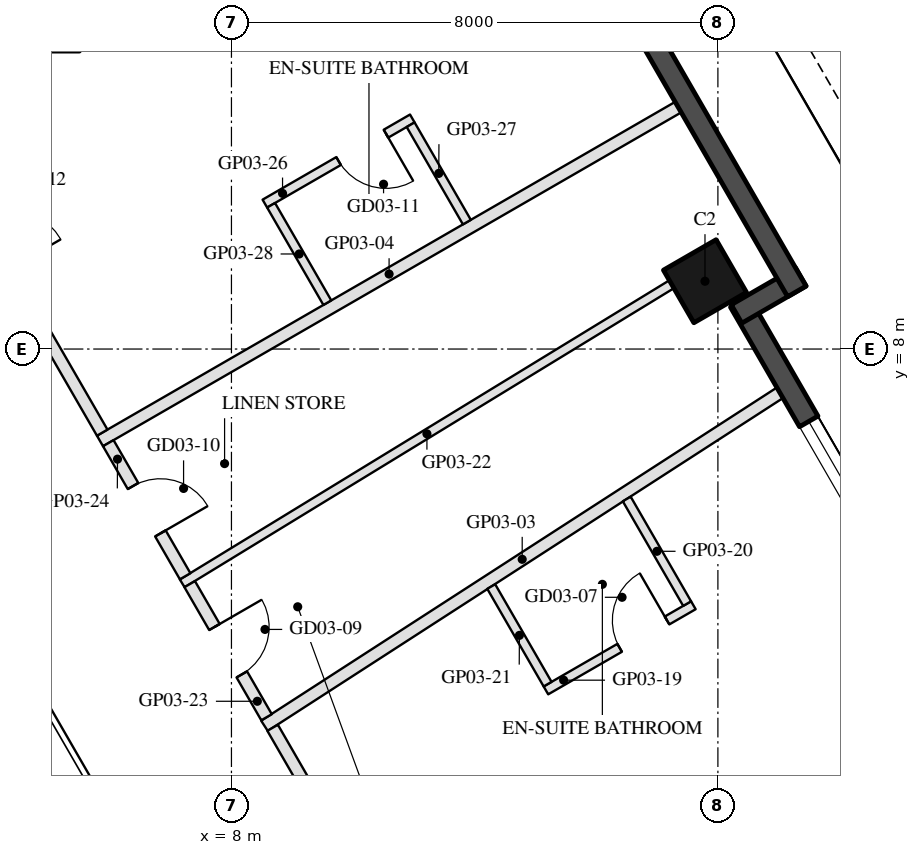
"""IFC4 building model, lengths in metres.
Left out: names, types, materials, properties, quantities, classifications, styles, units other than length and angle.
Written with IfcOpenShell. Run it as: python <this file> out.ifc"""

import sys

from ifc_helpers import new_model, si_unit, direction, frame, frame_2d, origin, origin_2d, place, context, subcontext, project, spatial, rectangle, hollow_rectangle, extrude, element, fill, save


model = new_model("IFC4")
c1 = context("Model", 3, precision=1e-05, world=origin(), true_north=direction((0.0, 1.0)))
c2 = subcontext(c1, "Body", "Model", "MODEL_VIEW")
j1 = project(units=[si_unit("LENGTHUNIT", "METRE"), si_unit("PLANEANGLEUNIT", "RADIAN")], contexts=[c1])
p1 = place(None, origin())
s1 = spatial("IfcSite", under=j1, at=p1, CompositionType="ELEMENT")
p2 = place(p1, origin())
s2 = spatial("IfcBuilding", under=s1, at=p2, CompositionType="ELEMENT")
p3 = place(p2, frame((0.0, 0.0, 68.7)))
s3 = spatial("IfcBuildingStorey", under=s2, at=p3, CompositionType="ELEMENT", Elevation=68.7)
p4 = place(p3, frame((15.788, 9.115, 0.0), z_axis=(0.0, 0.0, 1.0), x_axis=(-0.5, 0.866025403784, 0.0)))
e1 = element("IfcColumn", 1, at=p4, inside=s3, PredefinedType="COLUMN", context=c2, shape_type="SweptSolid", body=[
    extrude(hollow_rectangle(XDim=1.0, YDim=1.0, WallThickness=0.045, at=origin_2d()), origin(), (0.0, 0.0, 1.0), 3.7),
])
p5 = place(p3, frame((19.729, 2.938, 0.0), z_axis=(0.0, 0.0, 1.0), x_axis=(-0.499976430342, 0.866039011305, 0.0)))
e2 = element("IfcWall", 2, at=p5, inside=s3, PredefinedType="SOLIDWALL", context=c2, shape_type="SweptSolid", body=[
    extrude(rectangle(XDim=6.74, YDim=0.35, at=frame_2d((3.37, 0.0))), origin(), (0.0, 0.0, 1.0), 3.55),
])
p6 = place(p5, frame((0.77, 0.0, 0.3)))
e3 = element("IfcOpeningElement", 3, at=p6, cuts=e2, PredefinedType="OPENING", context=c2, shape_type="SweptSolid", body=[
    extrude(rectangle(XDim=1.7, YDim=2.65, at=frame_2d((0.85, 1.325))), frame((0.0, 0.185, 0.0), z_axis=(0.0, -1.0, 0.0), x_axis=(1.0, 0.0, 0.0)), (0.0, 0.0, 1.0), 0.37),
])
p7 = place(p5, frame((2.77, 0.0, 0.3)))
e4 = element("IfcOpeningElement", 4, at=p7, cuts=e2, PredefinedType="OPENING", context=c2, shape_type="SweptSolid", body=[
    extrude(rectangle(XDim=1.7, YDim=2.65, at=frame_2d((0.85, 1.325))), frame((0.0, 0.185, 0.0), z_axis=(0.0, -1.0, 0.0), x_axis=(1.0, 0.0, 0.0)), (0.0, 0.0, 1.0), 0.37),
])
p8 = place(p3, frame((16.306, 8.577, 0.0), z_axis=(0.0, 0.0, 1.0), x_axis=(0.866092288191, 0.499884134912, 0.0)))
e5 = element("IfcWall", 5, at=p8, inside=s3, PredefinedType="SOLIDWALL", context=c2, shape_type="SweptSolid", body=[
    extrude(rectangle(XDim=1.22, YDim=0.35, at=frame_2d((0.61, 0.0))), origin(), (0.0, 0.0, 1.0), 3.55),
])
p9 = place(p3, frame((17.299, 8.948, 0.0), z_axis=(0.0, 0.0, 1.0), x_axis=(-0.500010041276, 0.866019606374, 0.0)))
e6 = element("IfcWall", 6, at=p9, inside=s3, PredefinedType="SOLIDWALL", context=c2, shape_type="SweptSolid", body=[
    extrude(rectangle(XDim=9.7, YDim=0.35, at=frame_2d((4.85, 0.0))), origin(), (0.0, 0.0, 1.0), 3.55),
])
p10 = place(p9, frame((4.949, 0.0, 0.3)))
e7 = element("IfcOpeningElement", 7, at=p10, cuts=e6, PredefinedType="OPENING", context=c2, shape_type="SweptSolid", body=[
    extrude(rectangle(XDim=3.0, YDim=2.65, at=frame_2d((1.5, 1.325))), frame((0.0, 0.185, 0.0), z_axis=(0.0, -1.0, 0.0), x_axis=(1.0, 0.0, 0.0)), (0.0, 0.0, 1.0), 0.37),
])
p11 = place(p3, frame((17.02, 7.28, 0.0), z_axis=(0.0, 0.0, 1.0), x_axis=(-0.839924980805, -0.542702521294, 0.0)))
e8 = element("IfcWall", 8, at=p11, inside=s3, PredefinedType="PARTITIONING", context=c2, shape_type="SweptSolid", body=[
    extrude(rectangle(XDim=10.093, YDim=0.2, at=frame_2d((5.046, 0.0))), origin(), (0.0, 0.0, 1.0), 2.96),
])
p12 = place(p3, frame((15.347, 11.978, 0.0), z_axis=(0.0, 0.0, 1.0), x_axis=(-0.866027479907, -0.499996404033, 0.0)))
e9 = element("IfcWall", 9, at=p12, inside=s3, PredefinedType="PARTITIONING", context=c2, shape_type="SweptSolid", body=[
    extrude(rectangle(XDim=10.98, YDim=0.2, at=frame_2d((5.49, 0.0))), origin(), (0.0, 0.0, 1.0), 2.96),
])
p13 = place(p3, frame((8.677, 1.771, 0.0), z_axis=(0.0, 0.0, 1.0), x_axis=(0.50000293509, -0.866023709203, 0.0)))
e10 = element("IfcWall", 10, at=p13, inside=s3, PredefinedType="PARTITIONING", context=c2, shape_type="SweptSolid", body=[
    extrude(rectangle(XDim=7.183, YDim=0.2, at=frame_2d((3.592, 0.0))), origin(), (0.0, 0.0, 1.0), 2.95),
])
p14 = place(p13, frame((3.092, 0.0, 0.0)))
e11 = element("IfcOpeningElement", 11, at=p14, cuts=e10, PredefinedType="OPENING", context=c2, shape_type="SweptSolid", body=[
    extrude(rectangle(XDim=1.0, YDim=2.1, at=frame_2d((0.5, 1.05))), frame((0.0, 0.11, 0.0), z_axis=(0.0, -1.0, 0.0), x_axis=(1.0, 0.0, 0.0)), (0.0, 0.0, 1.0), 0.22),
])
p15 = place(p3, frame((13.172, 2.386, 0.0), z_axis=(0.0, 0.0, 1.0), x_axis=(0.865996816683, 0.500049511043, 0.0)))
e12 = element("IfcWall", 12, at=p15, inside=s3, PredefinedType="PARTITIONING", context=c2, shape_type="SweptSolid", body=[
    extrude(rectangle(XDim=2.8, YDim=0.15, at=frame_2d((1.4, 0.0))), origin(), (0.0, 0.0, 1.0), 3.55),
])
p16 = place(p15, frame((1.4, 0.0, 0.0)))
e13 = element("IfcOpeningElement", 13, at=p16, cuts=e12, PredefinedType="OPENING", context=c2, shape_type="SweptSolid", body=[
    extrude(rectangle(XDim=0.9, YDim=2.1, at=frame_2d((0.45, 1.05))), frame((0.0, 0.085, 0.0), z_axis=(0.0, -1.0, 0.0), x_axis=(1.0, 0.0, 0.0)), (0.0, 0.0, 1.0), 0.17),
])
p17 = place(p3, frame((15.494, 3.813, 0.0), z_axis=(0.0, 0.0, 1.0), x_axis=(-0.499945861543, 0.866056658381, 0.0)))
e14 = element("IfcWall", 14, at=p17, inside=s3, PredefinedType="PARTITIONING", context=c2, shape_type="SweptSolid", body=[
    extrude(rectangle(XDim=1.987, YDim=0.15, at=frame_2d((0.993, 0.0))), origin(), (0.0, 0.0, 1.0), 2.95),
])
p18 = place(p3, frame((13.199, 2.488, 0.0), z_axis=(0.0, 0.0, 1.0), x_axis=(-0.499992292652, 0.866029853578, 0.0)))
e15 = element("IfcWall", 15, at=p18, inside=s3, PredefinedType="PARTITIONING", context=c2, shape_type="SweptSolid", body=[
    extrude(rectangle(XDim=1.854, YDim=0.15, at=frame_2d((0.927, 0.0))), origin(), (0.0, 0.0, 1.0), 2.95),
])
p19 = place(p3, frame((15.239, 9.065, 0.0), z_axis=(0.0, 0.0, 1.0), x_axis=(-0.853241525467, -0.521515962573, 0.0)))
e16 = element("IfcWall", 16, at=p19, inside=s3, PredefinedType="PARTITIONING", context=c2, shape_type="SweptSolid", body=[
    extrude(rectangle(XDim=9.433, YDim=0.15, at=frame_2d((4.716, 0.0))), origin(), (0.0, 0.0, 1.0), 2.95),
])
p20 = place(p3, frame((7.313, 4.133, 0.0), z_axis=(0.0, 0.0, 1.0), x_axis=(0.500003972934, -0.866023109998, 0.0)))
e17 = element("IfcWall", 17, at=p20, inside=s3, PredefinedType="PARTITIONING", context=c2, shape_type="SweptSolid", body=[
    extrude(rectangle(XDim=2.527, YDim=0.2, at=frame_2d((1.264, 0.0))), origin(), (0.0, 0.0, 1.0), 2.95),
])
p21 = place(p20, frame((0.814, 0.0, 0.0)))
e18 = element("IfcOpeningElement", 18, at=p21, cuts=e17, PredefinedType="OPENING", context=c2, shape_type="SweptSolid", body=[
    extrude(rectangle(XDim=0.9, YDim=2.1, at=frame_2d((0.45, 1.05))), frame((0.0, 0.11, 0.0), z_axis=(0.0, -1.0, 0.0), x_axis=(1.0, 0.0, 0.0)), (0.0, 0.0, 1.0), 0.22),
])
p22 = place(p3, frame((5.975, 6.452, 0.0), z_axis=(0.0, 0.0, 1.0), x_axis=(0.499962146402, -0.866047257466, 0.0)))
e19 = element("IfcWall", 19, at=p22, inside=s3, PredefinedType="PARTITIONING", context=c2, shape_type="SweptSolid", body=[
    extrude(rectangle(XDim=2.528, YDim=0.2, at=frame_2d((1.264, 0.0))), origin(), (0.0, 0.0, 1.0), 2.95),
])
p23 = place(p22, frame((0.814, 0.0, 0.0)))
e20 = element("IfcOpeningElement", 20, at=p23, cuts=e19, PredefinedType="OPENING", context=c2, shape_type="SweptSolid", body=[
    extrude(rectangle(XDim=0.9, YDim=2.1, at=frame_2d((0.45, 1.05))), frame((0.0, 0.11, 0.0), z_axis=(0.0, -1.0, 0.0), x_axis=(1.0, 0.0, 0.0)), (0.0, 0.0, 1.0), 0.22),
])
p24 = place(p3, frame((2.281, 12.85, 0.0), z_axis=(0.0, 0.0, 1.0), x_axis=(0.499992939664, -0.866029480033, 0.0)))
e21 = element("IfcWall", 21, at=p24, inside=s3, PredefinedType="PARTITIONING", context=c2, shape_type="SweptSolid", body=[
    extrude(rectangle(XDim=7.188, YDim=0.2, at=frame_2d((3.594, 0.0))), origin(), (0.0, 0.0, 1.0), 2.95),
])
p25 = place(p24, frame((3.094, 0.0, 0.0)))
e22 = element("IfcOpeningElement", 22, at=p25, cuts=e21, PredefinedType="OPENING", context=c2, shape_type="SweptSolid", body=[
    extrude(rectangle(XDim=1.0, YDim=2.1, at=frame_2d((0.5, 1.05))), frame((0.0, 0.11, 0.0), z_axis=(0.0, -1.0, 0.0), x_axis=(1.0, 0.0, 0.0)), (0.0, 0.0, 1.0), 0.22),
])
p26 = place(p3, frame((10.974, 11.792, 0.0), z_axis=(0.0, 0.0, 1.0), x_axis=(-0.866056369097, -0.49994636267, 0.0)))
e23 = element("IfcWall", 23, at=p26, inside=s3, PredefinedType="PARTITIONING", context=c2, shape_type="SweptSolid", body=[
    extrude(rectangle(XDim=2.8, YDim=0.15, at=frame_2d((1.4, 0.0))), origin(), (0.0, 0.0, 1.0), 3.55),
])
p27 = place(p26, frame((0.5, 0.0, 0.0)))
e24 = element("IfcOpeningElement", 24, at=p27, cuts=e23, PredefinedType="OPENING", context=c2, shape_type="SweptSolid", body=[
    extrude(rectangle(XDim=0.9, YDim=2.1, at=frame_2d((0.45, 1.05))), frame((0.0, 0.085, 0.0), z_axis=(0.0, -1.0, 0.0), x_axis=(1.0, 0.0, 0.0)), (0.0, 0.0, 1.0), 0.17),
])
for number, where, z_axis, x_axis in (
    (25, (11.872, 10.087, 0.0), (0.0, 0.0, 1.0), (-0.5, 0.866, 0.0)),
    (26, (9.577, 8.762, 0.0), (0.0, 0.0, 1.0), (-0.5, 0.866, 0.0)),
):
    element("IfcWall", number, at=place(p3, frame(where, z_axis=z_axis, x_axis=x_axis)), inside=s3, PredefinedType="PARTITIONING", context=c2, shape_type="SweptSolid", body=[
        extrude(rectangle(XDim=1.85, YDim=0.15, at=frame_2d((0.925, 0.0))), origin(), (0.0, 0.0, 1.0), 2.95),
    ])
p28 = place(p7, origin())
e27 = element("IfcWindow", 27, at=p28, inside=s3, PartitioningType="SINGLE_PANEL", PredefinedType="WINDOW", context=c2, shape_type="SweptSolid", body=[
    extrude(rectangle(XDim=1.7, YDim=2.65, at=frame_2d((0.85, 1.325))), frame((0.0, 0.03, 0.0), z_axis=(0.0, -1.0, 0.0), x_axis=(1.0, 0.0, 0.0)), (0.0, 0.0, 1.0), 0.06),
])
fill(e4, e27)
p29 = place(p16, origin())
e28 = element("IfcDoor", 28, at=p29, inside=s3, OperationType="SINGLE_SWING_RIGHT", PredefinedType="DOOR", context=c2, shape_type="SweptSolid", body=[
    extrude(rectangle(XDim=0.9, YDim=2.1, at=frame_2d((0.45, 1.05))), frame((0.0, 0.025, 0.0), z_axis=(0.0, -1.0, 0.0), x_axis=(1.0, 0.0, 0.0)), (0.0, 0.0, 1.0), 0.05),
])
fill(e13, e28)
p30 = place(p21, origin())
e29 = element("IfcDoor", 29, at=p30, inside=s3, OperationType="SINGLE_SWING_LEFT", PredefinedType="DOOR", context=c2, shape_type="SweptSolid", body=[
    extrude(rectangle(XDim=0.9, YDim=2.1, at=frame_2d((0.45, 1.05))), frame((0.0, 0.025, 0.0), z_axis=(0.0, -1.0, 0.0), x_axis=(1.0, 0.0, 0.0)), (0.0, 0.0, 1.0), 0.05),
])
fill(e18, e29)
p31 = place(p23, origin())
e30 = element("IfcDoor", 30, at=p31, inside=s3, OperationType="SINGLE_SWING_RIGHT", PredefinedType="DOOR", context=c2, shape_type="SweptSolid", body=[
    extrude(rectangle(XDim=0.9, YDim=2.1, at=frame_2d((0.45, 1.05))), frame((0.0, 0.025, 0.0), z_axis=(0.0, -1.0, 0.0), x_axis=(1.0, 0.0, 0.0)), (0.0, 0.0, 1.0), 0.05),
])
fill(e20, e30)
p32 = place(p27, origin())
e31 = element("IfcDoor", 31, at=p32, inside=s3, OperationType="SINGLE_SWING_LEFT", PredefinedType="DOOR", context=c2, shape_type="SweptSolid", body=[
    extrude(rectangle(XDim=0.9, YDim=2.1, at=frame_2d((0.45, 1.05))), frame((0.0, 0.025, 0.0), z_axis=(0.0, -1.0, 0.0), x_axis=(1.0, 0.0, 0.0)), (0.0, 0.0, 1.0), 0.05),
])
fill(e24, e31)
save(model, sys.argv[1])
